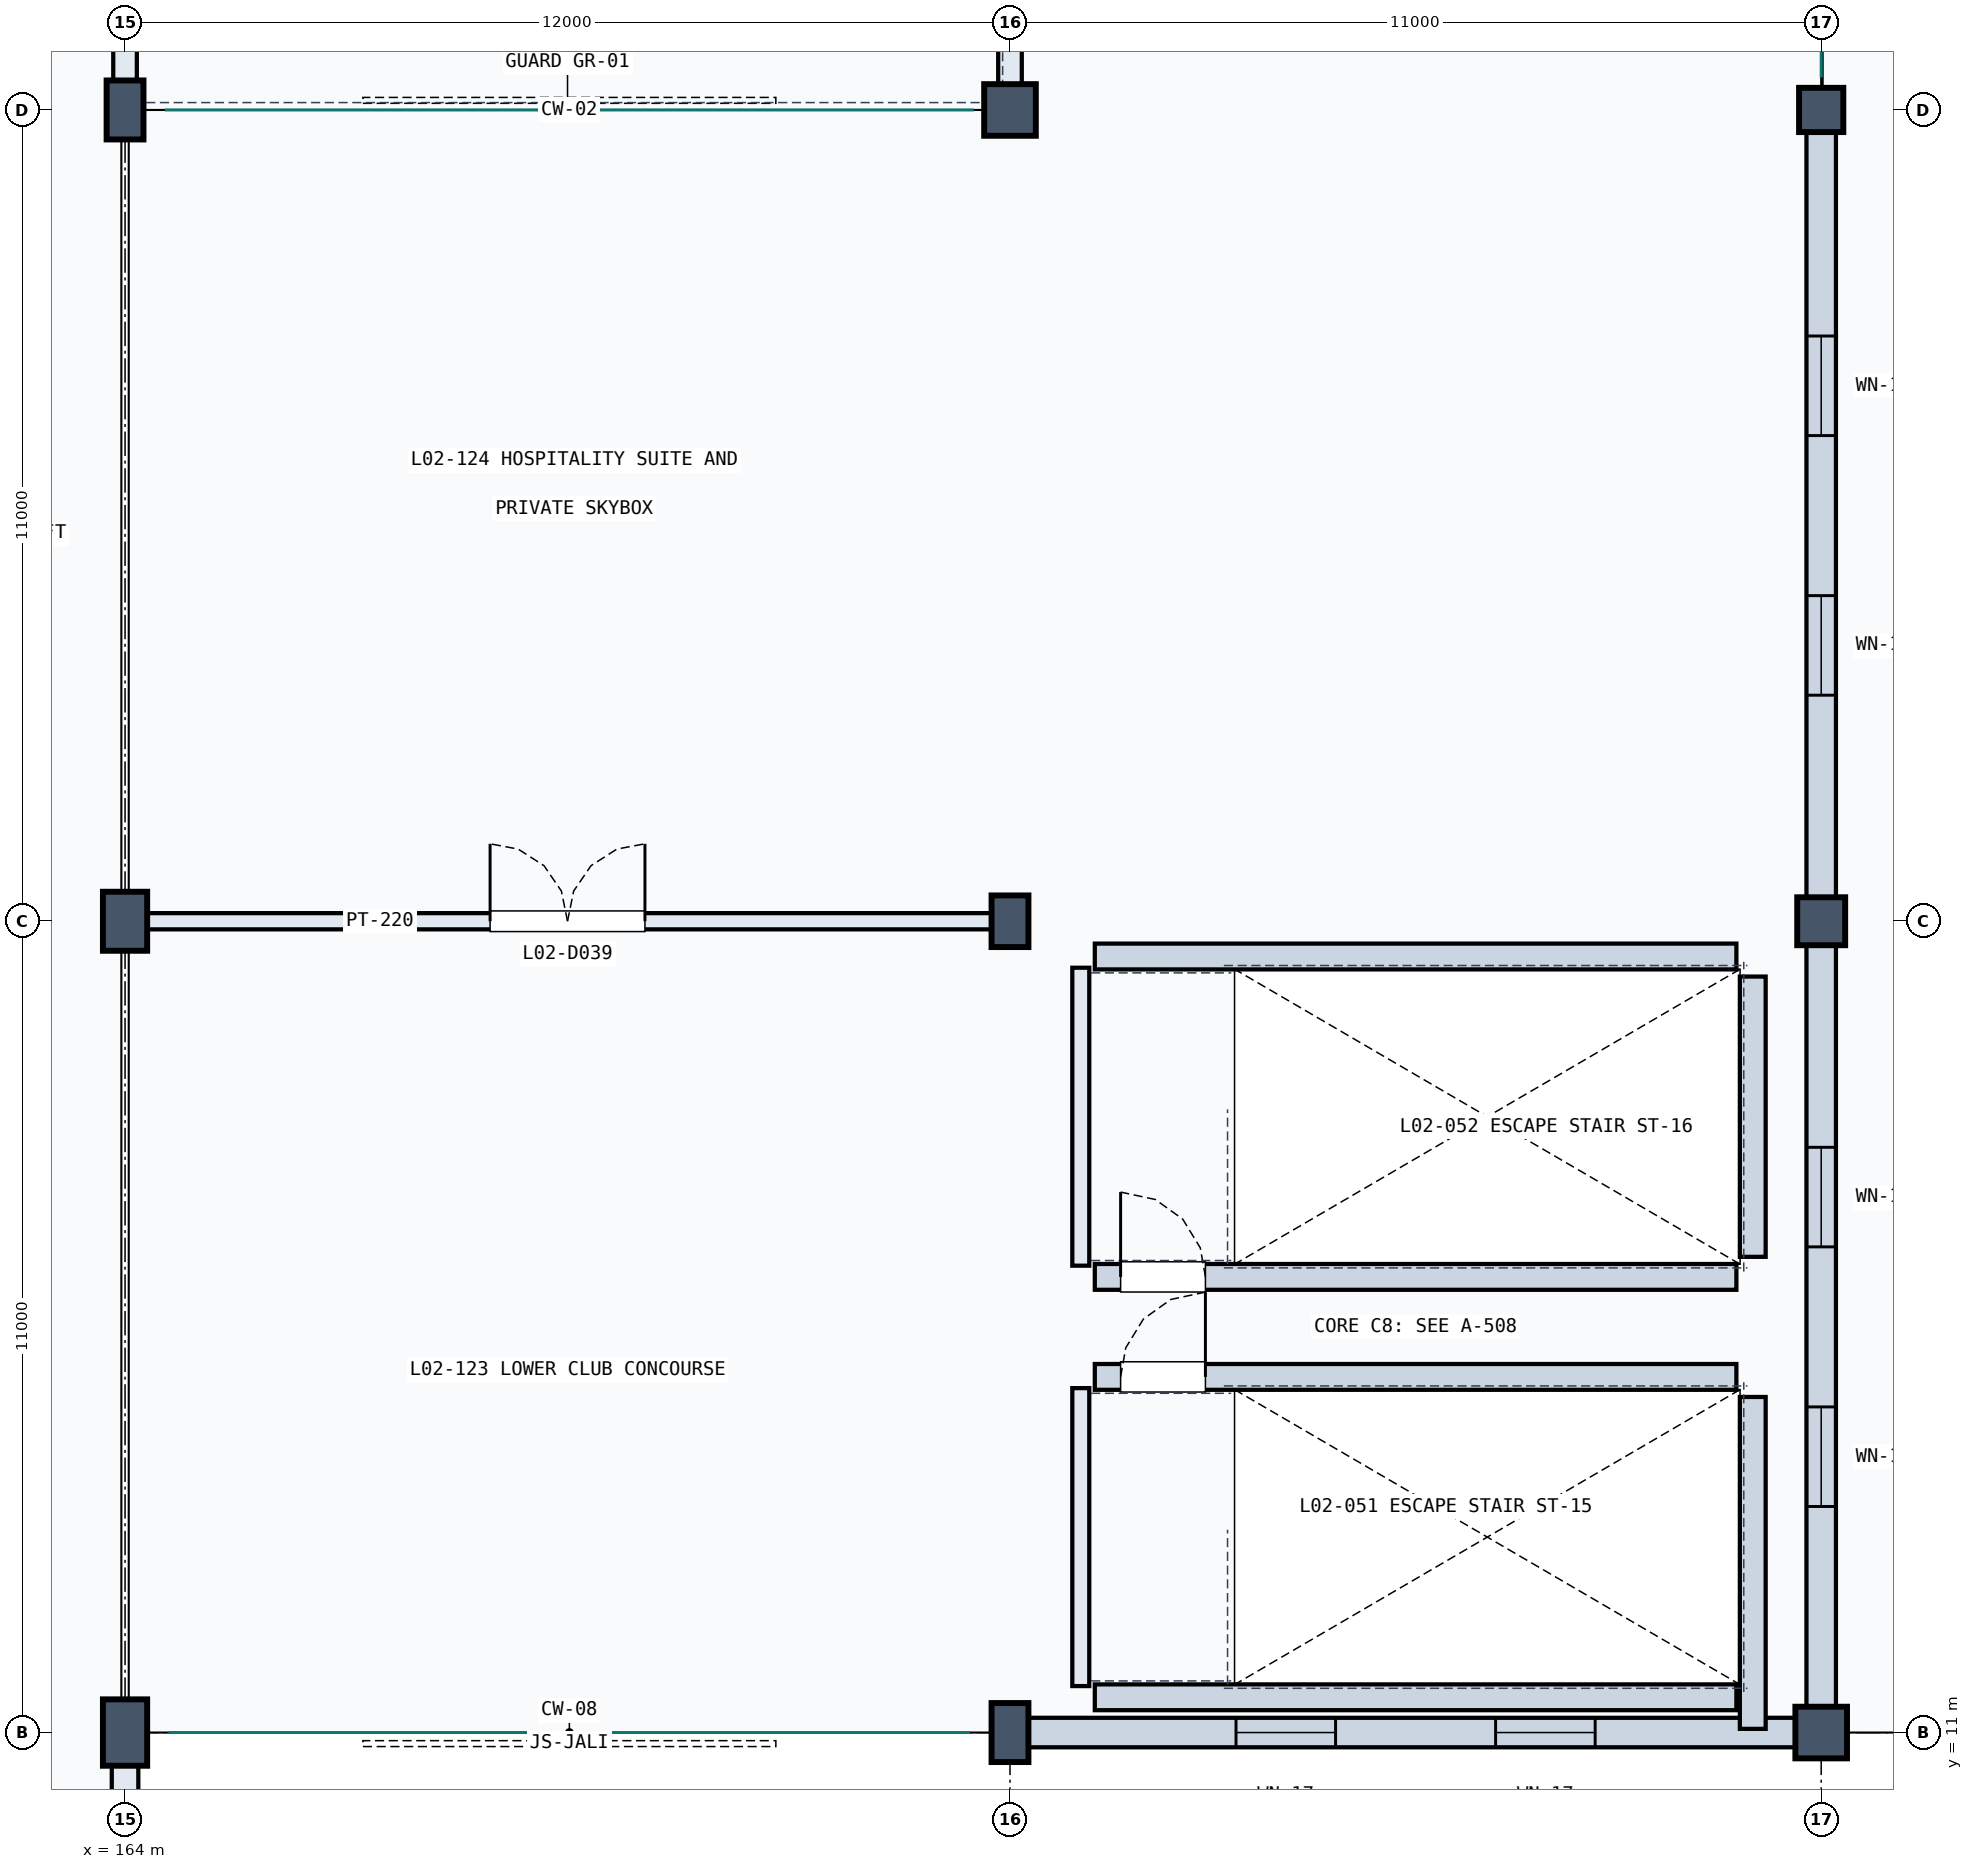
"""IFC4 building model, lengths in metres.
Left out: names, types, materials, properties, quantities, classifications, styles, units other than length and angle.
Written with IfcOpenShell. Run it as: python <this file> out.ifc"""

import sys

from ifc_helpers import new_model, si_unit, direction, frame, frame_2d, origin, origin_2d, place, context, subcontext, project, spatial, rectangle, extrude, element, fill, save


model = new_model("IFC4")
c1 = context("Model", 3, precision=1e-05, world=origin(), true_north=direction((0.0, 1.0)))
c2 = subcontext(c1, "Body", "Model", "MODEL_VIEW")
j1 = project(units=[si_unit("LENGTHUNIT", "METRE"), si_unit("PLANEANGLEUNIT", "RADIAN")], contexts=[c1])
p1 = place(None, origin())
s1 = spatial("IfcSite", under=j1, at=p1, CompositionType="ELEMENT")
p2 = place(p1, origin())
s2 = spatial("IfcBuilding", under=s1, at=p2, CompositionType="ELEMENT")
p3 = place(p2, frame((0.0, 0.0, 10.2)))
s3 = spatial("IfcBuildingStorey", under=s2, at=p3, CompositionType="ELEMENT", Elevation=10.2)
p4 = place(p3, frame((164.0, 11.0, 0.0), z_axis=(0.0, 0.0, 1.0), x_axis=(1.0, 0.0, 0.0)))
e1 = element("IfcColumn", 1, at=p4, inside=s3, PredefinedType="COLUMN", context=c2, shape_type="SweptSolid", body=[
    extrude(rectangle(XDim=0.6, YDim=0.9, at=origin_2d()), origin(), (0.0, 0.0, 1.0), 4.5),
])
p5 = place(p3, frame((164.0, 22.0, 0.0), z_axis=(0.0, 0.0, 1.0), x_axis=(1.0, 0.0, 0.0)))
e2 = element("IfcColumn", 2, at=p5, inside=s3, PredefinedType="COLUMN", context=c2, shape_type="SweptSolid", body=[
    extrude(rectangle(XDim=0.6, YDim=0.8, at=origin_2d()), origin(), (0.0, 0.0, 1.0), 4.5),
])
for number, where, z_axis, x_axis in (
    (3, (164.0, 33.0, 0.0), (0.0, 0.0, 1.0), (1.0, 0.0, 0.0)),
    (4, (176.0, 11.0, 0.0), (0.0, 0.0, 1.0), (1.0, 0.0, 0.0)),
):
    element("IfcColumn", number, at=place(p3, frame(where, z_axis=z_axis, x_axis=x_axis)), inside=s3, PredefinedType="COLUMN", context=c2, shape_type="SweptSolid", body=[
        extrude(rectangle(XDim=0.5, YDim=0.8, at=origin_2d()), origin(), (0.0, 0.0, 1.0), 4.5),
    ])
p6 = place(p3, frame((176.0, 22.0, 0.0), z_axis=(0.0, 0.0, 1.0), x_axis=(1.0, 0.0, 0.0)))
e5 = element("IfcColumn", 5, at=p6, inside=s3, PredefinedType="COLUMN", context=c2, shape_type="SweptSolid", body=[
    extrude(rectangle(XDim=0.5, YDim=0.7, at=origin_2d()), origin(), (0.0, 0.0, 1.0), 4.5),
])
for number, where, z_axis, x_axis in (
    (6, (176.0, 33.0, 0.0), (0.0, 0.0, 1.0), (1.0, 0.0, 0.0)),
    (7, (187.0, 11.0, 0.0), (0.0, 0.0, 1.0), (1.0, 0.0, 0.0)),
):
    element("IfcColumn", number, at=place(p3, frame(where, z_axis=z_axis, x_axis=x_axis)), inside=s3, PredefinedType="COLUMN", context=c2, shape_type="SweptSolid", body=[
        extrude(rectangle(XDim=0.7, YDim=0.7, at=origin_2d()), origin(), (0.0, 0.0, 1.0), 4.5),
    ])
p7 = place(p3, frame((187.0, 22.0, 0.0), z_axis=(0.0, 0.0, 1.0), x_axis=(1.0, 0.0, 0.0)))
e8 = element("IfcColumn", 8, at=p7, inside=s3, PredefinedType="COLUMN", context=c2, shape_type="SweptSolid", body=[
    extrude(rectangle(XDim=0.65, YDim=0.65, at=origin_2d()), origin(), (0.0, 0.0, 1.0), 4.5),
])
p8 = place(p3, frame((187.0, 33.0, 0.0), z_axis=(0.0, 0.0, 1.0), x_axis=(1.0, 0.0, 0.0)))
e9 = element("IfcColumn", 9, at=p8, inside=s3, PredefinedType="COLUMN", context=c2, shape_type="SweptSolid", body=[
    extrude(rectangle(XDim=0.6, YDim=0.6, at=origin_2d()), origin(), (0.0, 0.0, 1.0), 4.5),
])
p9 = place(p3, frame((164.0, 0.22, 0.0), z_axis=(0.0, 0.0, 1.0), x_axis=(0.0, 1.0, 0.0)))
e10 = element("IfcWall", 10, at=p9, inside=s3, PredefinedType="SOLIDWALL", context=c2, shape_type="SweptSolid", body=[
    extrude(rectangle(XDim=10.56, YDim=0.36, at=frame_2d((5.28, 0.0))), origin(), (0.0, 0.0, 1.0), 3.405),
])
p10 = place(p9, frame((4.03, 0.0, 1.0)))
e11 = element("IfcOpeningElement", 11, at=p10, cuts=e10, PredefinedType="OPENING", context=c2, shape_type="SweptSolid", body=[
    extrude(rectangle(XDim=2.5, YDim=1.35, at=frame_2d((1.25, 0.675))), frame((0.0, 0.19, 0.0), z_axis=(0.0, -1.0, 0.0), x_axis=(1.0, 0.0, 0.0)), (0.0, 0.0, 1.0), 0.38),
])
p11 = place(p3, frame((164.0, 33.22, 0.0), z_axis=(0.0, 0.0, 1.0), x_axis=(0.0, 1.0, 0.0)))
e12 = element("IfcWall", 12, at=p11, inside=s3, PredefinedType="SOLIDWALL", context=c2, shape_type="SweptSolid", body=[
    extrude(rectangle(XDim=10.56, YDim=0.32, at=frame_2d((5.28, 0.0))), origin(), (0.0, 0.0, 1.0), 3.19),
])
p12 = place(p11, frame((4.455, 0.0, 0.0)))
e13 = element("IfcOpeningElement", 13, at=p12, cuts=e12, PredefinedType="OPENING", context=c2, shape_type="SweptSolid", body=[
    extrude(rectangle(XDim=1.65, YDim=2.3, at=frame_2d((0.825, 1.15))), frame((0.0, 0.17, 0.0), z_axis=(0.0, -1.0, 0.0), x_axis=(1.0, 0.0, 0.0)), (0.0, 0.0, 1.0), 0.34),
])
p13 = place(p3, frame((176.22, 11.0, 0.0), z_axis=(0.0, 0.0, 1.0), x_axis=(1.0, 0.0, 0.0)))
e14 = element("IfcWall", 14, at=p13, inside=s3, PredefinedType="SOLIDWALL", context=c2, shape_type="SweptSolid", body=[
    extrude(rectangle(XDim=10.56, YDim=0.4, at=frame_2d((5.28, 0.0))), origin(), (0.0, 0.0, 1.0), 3.405),
])
p14 = place(p13, frame((2.845, 0.0, 0.8)))
e15 = element("IfcOpeningElement", 15, at=p14, cuts=e14, PredefinedType="OPENING", context=c2, shape_type="SweptSolid", body=[
    extrude(rectangle(XDim=1.35, YDim=2.1, at=frame_2d((0.675, 1.05))), frame((0.0, 0.21, 0.0), z_axis=(0.0, -1.0, 0.0), x_axis=(1.0, 0.0, 0.0)), (0.0, 0.0, 1.0), 0.42),
])
p15 = place(p13, frame((6.365, 0.0, 0.8)))
e16 = element("IfcOpeningElement", 16, at=p15, cuts=e14, PredefinedType="OPENING", context=c2, shape_type="SweptSolid", body=[
    extrude(rectangle(XDim=1.35, YDim=2.1, at=frame_2d((0.675, 1.05))), frame((0.0, 0.21, 0.0), z_axis=(0.0, -1.0, 0.0), x_axis=(1.0, 0.0, 0.0)), (0.0, 0.0, 1.0), 0.42),
])
p16 = place(p3, frame((187.0, 11.22, 0.0), z_axis=(0.0, 0.0, 1.0), x_axis=(0.0, 1.0, 0.0)))
e17 = element("IfcWall", 17, at=p16, inside=s3, PredefinedType="SOLIDWALL", context=c2, shape_type="SweptSolid", body=[
    extrude(rectangle(XDim=10.56, YDim=0.4, at=frame_2d((5.28, 0.0))), origin(), (0.0, 0.0, 1.0), 3.405),
])
p17 = place(p16, frame((2.845, 0.0, 0.8)))
e18 = element("IfcOpeningElement", 18, at=p17, cuts=e17, PredefinedType="OPENING", context=c2, shape_type="SweptSolid", body=[
    extrude(rectangle(XDim=1.35, YDim=2.1, at=frame_2d((0.675, 1.05))), frame((0.0, 0.21, 0.0), z_axis=(0.0, -1.0, 0.0), x_axis=(1.0, 0.0, 0.0)), (0.0, 0.0, 1.0), 0.42),
])
p18 = place(p16, frame((6.365, 0.0, 0.8)))
e19 = element("IfcOpeningElement", 19, at=p18, cuts=e17, PredefinedType="OPENING", context=c2, shape_type="SweptSolid", body=[
    extrude(rectangle(XDim=1.35, YDim=2.1, at=frame_2d((0.675, 1.05))), frame((0.0, 0.21, 0.0), z_axis=(0.0, -1.0, 0.0), x_axis=(1.0, 0.0, 0.0)), (0.0, 0.0, 1.0), 0.42),
])
p19 = place(p3, frame((187.0, 22.22, 0.0), z_axis=(0.0, 0.0, 1.0), x_axis=(0.0, 1.0, 0.0)))
e20 = element("IfcWall", 20, at=p19, inside=s3, PredefinedType="SOLIDWALL", context=c2, shape_type="SweptSolid", body=[
    extrude(rectangle(XDim=10.56, YDim=0.4, at=frame_2d((5.28, 0.0))), origin(), (0.0, 0.0, 1.0), 3.405),
])
p20 = place(p19, frame((2.845, 0.0, 0.8)))
e21 = element("IfcOpeningElement", 21, at=p20, cuts=e20, PredefinedType="OPENING", context=c2, shape_type="SweptSolid", body=[
    extrude(rectangle(XDim=1.35, YDim=2.1, at=frame_2d((0.675, 1.05))), frame((0.0, 0.21, 0.0), z_axis=(0.0, -1.0, 0.0), x_axis=(1.0, 0.0, 0.0)), (0.0, 0.0, 1.0), 0.42),
])
p21 = place(p19, frame((6.365, 0.0, 0.8)))
e22 = element("IfcOpeningElement", 22, at=p21, cuts=e20, PredefinedType="OPENING", context=c2, shape_type="SweptSolid", body=[
    extrude(rectangle(XDim=1.35, YDim=2.1, at=frame_2d((0.675, 1.05))), frame((0.0, 0.21, 0.0), z_axis=(0.0, -1.0, 0.0), x_axis=(1.0, 0.0, 0.0)), (0.0, 0.0, 1.0), 0.42),
])
p22 = place(p3, frame((176.0, 33.22, 0.0), z_axis=(0.0, 0.0, 1.0), x_axis=(0.0, 1.0, 0.0)))
e23 = element("IfcWall", 23, at=p22, inside=s3, PredefinedType="SOLIDWALL", context=c2, shape_type="SweptSolid", body=[
    extrude(rectangle(XDim=10.56, YDim=0.32, at=frame_2d((5.28, 0.0))), origin(), (0.0, 0.0, 1.0), 3.405),
])
p23 = place(p22, frame((3.78, 0.0, 0.9)))
e24 = element("IfcOpeningElement", 24, at=p23, cuts=e23, PredefinedType="OPENING", context=c2, shape_type="SweptSolid", body=[
    extrude(rectangle(XDim=3.0, YDim=1.8, at=frame_2d((1.5, 0.9))), frame((0.0, 0.17, 0.0), z_axis=(0.0, -1.0, 0.0), x_axis=(1.0, 0.0, 0.0)), (0.0, 0.0, 1.0), 0.34),
])
p24 = place(p3, frame((176.96, 11.63, 0.0), z_axis=(0.0, 0.0, 1.0), x_axis=(0.0, 1.0, 0.0)))
e25 = element("IfcWall", 25, at=p24, inside=s3, PredefinedType="SOLIDWALL", context=c2, shape_type="SweptSolid", body=[
    extrude(rectangle(XDim=4.04, YDim=0.23, at=frame_2d((2.02, 0.0))), origin(), (0.0, 0.0, 1.0), 4.14),
])
p25 = place(p3, frame((186.072, 11.05, 0.0), z_axis=(0.0, 0.0, 1.0), x_axis=(0.0, 1.0, 0.0)))
e26 = element("IfcWall", 26, at=p25, inside=s3, PredefinedType="SOLIDWALL", context=c2, shape_type="SweptSolid", body=[
    extrude(rectangle(XDim=4.5, YDim=0.35, at=frame_2d((2.25, 0.0))), origin(), (0.0, 0.0, 1.0), 4.14),
])
p26 = place(p3, frame((177.15, 11.478, 0.0), z_axis=(0.0, 0.0, 1.0), x_axis=(1.0, 0.0, 0.0)))
e27 = element("IfcWall", 27, at=p26, inside=s3, PredefinedType="SOLIDWALL", context=c2, shape_type="SweptSolid", body=[
    extrude(rectangle(XDim=8.7, YDim=0.35, at=frame_2d((4.35, 0.0))), origin(), (0.0, 0.0, 1.0), 4.14),
])
p27 = place(p3, frame((177.15, 15.822, 0.0), z_axis=(0.0, 0.0, 1.0), x_axis=(1.0, 0.0, 0.0)))
e28 = element("IfcWall", 28, at=p27, inside=s3, PredefinedType="SOLIDWALL", context=c2, shape_type="SweptSolid", body=[
    extrude(rectangle(XDim=8.7, YDim=0.35, at=frame_2d((4.35, 0.0))), origin(), (0.0, 0.0, 1.0), 4.14),
])
p28 = place(p27, frame((0.35, 0.0, 0.0)))
e29 = element("IfcOpeningElement", 29, at=p28, cuts=e28, PredefinedType="OPENING", context=c2, shape_type="SweptSolid", body=[
    extrude(rectangle(XDim=1.15, YDim=2.2, at=frame_2d((0.575, 1.1))), frame((0.0, 0.185, 0.0), z_axis=(0.0, -1.0, 0.0), x_axis=(1.0, 0.0, 0.0)), (0.0, 0.0, 1.0), 0.37),
])
p29 = place(p3, frame((176.96, 17.33, 0.0), z_axis=(0.0, 0.0, 1.0), x_axis=(0.0, 1.0, 0.0)))
e30 = element("IfcWall", 30, at=p29, inside=s3, PredefinedType="SOLIDWALL", context=c2, shape_type="SweptSolid", body=[
    extrude(rectangle(XDim=4.04, YDim=0.23, at=frame_2d((2.02, 0.0))), origin(), (0.0, 0.0, 1.0), 4.14),
])
p30 = place(p3, frame((186.072, 17.45, 0.0), z_axis=(0.0, 0.0, 1.0), x_axis=(0.0, 1.0, 0.0)))
e31 = element("IfcWall", 31, at=p30, inside=s3, PredefinedType="SOLIDWALL", context=c2, shape_type="SweptSolid", body=[
    extrude(rectangle(XDim=3.8, YDim=0.35, at=frame_2d((1.9, 0.0))), origin(), (0.0, 0.0, 1.0), 4.14),
])
p31 = place(p3, frame((177.15, 17.178, 0.0), z_axis=(0.0, 0.0, 1.0), x_axis=(1.0, 0.0, 0.0)))
e32 = element("IfcWall", 32, at=p31, inside=s3, PredefinedType="SOLIDWALL", context=c2, shape_type="SweptSolid", body=[
    extrude(rectangle(XDim=8.7, YDim=0.35, at=frame_2d((4.35, 0.0))), origin(), (0.0, 0.0, 1.0), 4.14),
])
p32 = place(p31, frame((0.35, 0.0, 0.0)))
e33 = element("IfcOpeningElement", 33, at=p32, cuts=e32, PredefinedType="OPENING", context=c2, shape_type="SweptSolid", body=[
    extrude(rectangle(XDim=1.15, YDim=2.2, at=frame_2d((0.575, 1.1))), frame((0.0, 0.185, 0.0), z_axis=(0.0, -1.0, 0.0), x_axis=(1.0, 0.0, 0.0)), (0.0, 0.0, 1.0), 0.37),
])
p33 = place(p3, frame((177.15, 21.522, 0.0), z_axis=(0.0, 0.0, 1.0), x_axis=(1.0, 0.0, 0.0)))
e34 = element("IfcWall", 34, at=p33, inside=s3, PredefinedType="SOLIDWALL", context=c2, shape_type="SweptSolid", body=[
    extrude(rectangle(XDim=8.7, YDim=0.35, at=frame_2d((4.35, 0.0))), origin(), (0.0, 0.0, 1.0), 4.14),
])
p34 = place(p3, frame((164.22, 22.0, 0.0), z_axis=(0.0, 0.0, 1.0), x_axis=(1.0, 0.0, 0.0)))
e35 = element("IfcWall", 35, at=p34, inside=s3, PredefinedType="PARTITIONING", context=c2, shape_type="SweptSolid", body=[
    extrude(rectangle(XDim=11.56, YDim=0.22, at=frame_2d((5.78, 0.0))), origin(), (0.0, 0.0, 1.0), 3.405),
])
p35 = place(p34, frame((4.73, 0.0, 0.0)))
e36 = element("IfcOpeningElement", 36, at=p35, cuts=e35, PredefinedType="OPENING", context=c2, shape_type="SweptSolid", body=[
    extrude(rectangle(XDim=2.1, YDim=2.2, at=frame_2d((1.05, 1.1))), frame((0.0, 0.12, 0.0), z_axis=(0.0, -1.0, 0.0), x_axis=(1.0, 0.0, 0.0)), (0.0, 0.0, 1.0), 0.24),
])
p36 = place(p14, origin())
e37 = element("IfcWindow", 37, at=p36, inside=s3, PartitioningType="SINGLE_PANEL", PredefinedType="WINDOW", context=c2, shape_type="SweptSolid", body=[
    extrude(rectangle(XDim=1.35, YDim=2.1, at=frame_2d((0.675, 1.05))), frame((0.0, 0.03, 0.0), z_axis=(0.0, -1.0, 0.0), x_axis=(1.0, 0.0, 0.0)), (0.0, 0.0, 1.0), 0.06),
])
fill(e15, e37)
p37 = place(p15, origin())
e38 = element("IfcWindow", 38, at=p37, inside=s3, PartitioningType="SINGLE_PANEL", PredefinedType="WINDOW", context=c2, shape_type="SweptSolid", body=[
    extrude(rectangle(XDim=1.35, YDim=2.1, at=frame_2d((0.675, 1.05))), frame((0.0, 0.03, 0.0), z_axis=(0.0, -1.0, 0.0), x_axis=(1.0, 0.0, 0.0)), (0.0, 0.0, 1.0), 0.06),
])
fill(e16, e38)
p38 = place(p17, origin())
e39 = element("IfcWindow", 39, at=p38, inside=s3, PartitioningType="SINGLE_PANEL", PredefinedType="WINDOW", context=c2, shape_type="SweptSolid", body=[
    extrude(rectangle(XDim=1.35, YDim=2.1, at=frame_2d((0.675, 1.05))), frame((0.0, 0.03, 0.0), z_axis=(0.0, -1.0, 0.0), x_axis=(1.0, 0.0, 0.0)), (0.0, 0.0, 1.0), 0.06),
])
fill(e18, e39)
p39 = place(p18, origin())
e40 = element("IfcWindow", 40, at=p39, inside=s3, PartitioningType="SINGLE_PANEL", PredefinedType="WINDOW", context=c2, shape_type="SweptSolid", body=[
    extrude(rectangle(XDim=1.35, YDim=2.1, at=frame_2d((0.675, 1.05))), frame((0.0, 0.03, 0.0), z_axis=(0.0, -1.0, 0.0), x_axis=(1.0, 0.0, 0.0)), (0.0, 0.0, 1.0), 0.06),
])
fill(e19, e40)
p40 = place(p20, origin())
e41 = element("IfcWindow", 41, at=p40, inside=s3, PartitioningType="SINGLE_PANEL", PredefinedType="WINDOW", context=c2, shape_type="SweptSolid", body=[
    extrude(rectangle(XDim=1.35, YDim=2.1, at=frame_2d((0.675, 1.05))), frame((0.0, 0.03, 0.0), z_axis=(0.0, -1.0, 0.0), x_axis=(1.0, 0.0, 0.0)), (0.0, 0.0, 1.0), 0.06),
])
fill(e21, e41)
p41 = place(p21, origin())
e42 = element("IfcWindow", 42, at=p41, inside=s3, PartitioningType="SINGLE_PANEL", PredefinedType="WINDOW", context=c2, shape_type="SweptSolid", body=[
    extrude(rectangle(XDim=1.35, YDim=2.1, at=frame_2d((0.675, 1.05))), frame((0.0, 0.03, 0.0), z_axis=(0.0, -1.0, 0.0), x_axis=(1.0, 0.0, 0.0)), (0.0, 0.0, 1.0), 0.06),
])
fill(e22, e42)
p42 = place(p28, origin())
e43 = element("IfcDoor", 43, at=p42, inside=s3, OperationType="SINGLE_SWING_RIGHT", PredefinedType="DOOR", context=c2, shape_type="SweptSolid", body=[
    extrude(rectangle(XDim=1.15, YDim=2.2, at=frame_2d((0.575, 1.1))), frame((0.0, 0.025, 0.0), z_axis=(0.0, -1.0, 0.0), x_axis=(1.0, 0.0, 0.0)), (0.0, 0.0, 1.0), 0.05),
])
fill(e29, e43)
p43 = place(p32, origin())
e44 = element("IfcDoor", 44, at=p43, inside=s3, OperationType="SINGLE_SWING_LEFT", PredefinedType="DOOR", context=c2, shape_type="SweptSolid", body=[
    extrude(rectangle(XDim=1.15, YDim=2.2, at=frame_2d((0.575, 1.1))), frame((0.0, 0.025, 0.0), z_axis=(0.0, -1.0, 0.0), x_axis=(1.0, 0.0, 0.0)), (0.0, 0.0, 1.0), 0.05),
])
fill(e33, e44)
p44 = place(p35, origin())
e45 = element("IfcDoor", 45, at=p44, inside=s3, OperationType="DOUBLE_DOOR_SINGLE_SWING", PredefinedType="DOOR", context=c2, shape_type="SweptSolid", body=[
    extrude(rectangle(XDim=2.1, YDim=2.2, at=frame_2d((1.05, 1.1))), frame((0.0, 0.025, 0.0), z_axis=(0.0, -1.0, 0.0), x_axis=(1.0, 0.0, 0.0)), (0.0, 0.0, 1.0), 0.05),
])
fill(e36, e45)
save(model, sys.argv[1])
